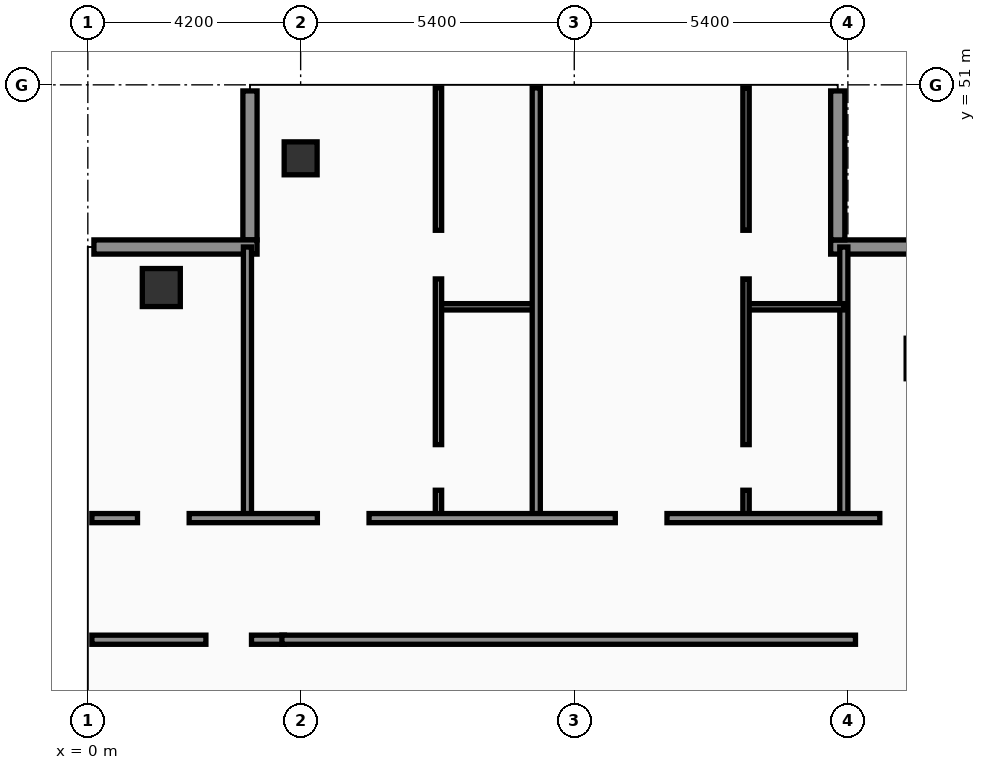
"""IFC4 building model, lengths in metres.
Left out: names, types, materials, properties, quantities, classifications, styles, units other than length and angle.
Written with IfcOpenShell. Run it as: python <this file> out.ifc"""

import sys

from ifc_helpers import new_model, si_unit, direction, frame, frame_2d, origin, origin_2d, place, context, subcontext, project, spatial, rectangle, hollow_rectangle, extrude, element, fill, save


model = new_model("IFC4")
c1 = context("Model", 3, precision=1e-05, world=origin(), true_north=direction((0.0, 1.0)))
c2 = subcontext(c1, "Body", "Model", "MODEL_VIEW")
j1 = project(units=[si_unit("LENGTHUNIT", "METRE"), si_unit("PLANEANGLEUNIT", "RADIAN")], contexts=[c1])
p1 = place(None, origin())
s1 = spatial("IfcSite", under=j1, at=p1, CompositionType="ELEMENT")
p2 = place(p1, origin())
s2 = spatial("IfcBuilding", under=s1, at=p2, CompositionType="ELEMENT")
p3 = place(p2, frame((0.0, 0.0, 211.0)))
s3 = spatial("IfcBuildingStorey", under=s2, at=p3, CompositionType="ELEMENT", Elevation=211.0)
p4 = place(p3, frame((1.45, 47.0, 0.0), z_axis=(0.0, 0.0, 1.0), x_axis=(1.0, 0.0, 0.0)))
e1 = element("IfcColumn", 1, at=p4, inside=s3, PredefinedType="COLUMN", context=c2, shape_type="SweptSolid", body=[
    extrude(hollow_rectangle(XDim=0.75, YDim=0.75, WallThickness=0.032, at=origin_2d()), origin(), (0.0, 0.0, 1.0), 3.56),
])
p5 = place(p3, frame((4.2, 49.55, 0.0), z_axis=(0.0, 0.0, 1.0), x_axis=(1.0, 0.0, 0.0)))
e2 = element("IfcColumn", 2, at=p5, inside=s3, PredefinedType="COLUMN", context=c2, shape_type="SweptSolid", body=[
    extrude(hollow_rectangle(XDim=0.65, YDim=0.65, WallThickness=0.028, at=origin_2d()), origin(), (0.0, 0.0, 1.0), 3.56),
])
p6 = place(p3, frame((17.9, 47.8, 0.0), z_axis=(0.0, 0.0, 1.0), x_axis=(-1.0, 0.0, 0.0)))
e3 = element("IfcWall", 3, at=p6, inside=s3, PredefinedType="SOLIDWALL", context=c2, shape_type="SweptSolid", body=[
    extrude(rectangle(XDim=3.24, YDim=0.28, at=frame_2d((1.62, 0.0))), origin(), (0.0, 0.0, 1.0), 3.56),
])
p7 = place(p3, frame((14.8, 47.94, 0.0), z_axis=(0.0, 0.0, 1.0), x_axis=(0.0, 1.0, 0.0)))
e4 = element("IfcWall", 4, at=p7, inside=s3, PredefinedType="SOLIDWALL", context=c2, shape_type="SweptSolid", body=[
    extrude(rectangle(XDim=2.94, YDim=0.28, at=frame_2d((1.47, 0.0))), origin(), (0.0, 0.0, 1.0), 3.56),
])
p8 = place(p3, frame((3.2, 50.88, 0.0), z_axis=(0.0, 0.0, 1.0), x_axis=(0.0, -1.0, 0.0)))
e5 = element("IfcWall", 5, at=p8, inside=s3, PredefinedType="SOLIDWALL", context=c2, shape_type="SweptSolid", body=[
    extrude(rectangle(XDim=2.94, YDim=0.28, at=frame_2d((1.47, 0.0))), origin(), (0.0, 0.0, 1.0), 3.09),
])
p9 = place(p3, frame((3.34, 47.8, 0.0), z_axis=(0.0, 0.0, 1.0), x_axis=(-1.0, 0.0, 0.0)))
e6 = element("IfcWall", 6, at=p9, inside=s3, PredefinedType="SOLIDWALL", context=c2, shape_type="SweptSolid", body=[
    extrude(rectangle(XDim=3.22, YDim=0.28, at=frame_2d((1.61, 0.0))), origin(), (0.0, 0.0, 1.0), 3.09),
])
p10 = place(p3, frame((0.08, 40.05, 0.0), z_axis=(0.0, 0.0, 1.0), x_axis=(1.0, 0.0, 0.0)))
e7 = element("IfcWall", 7, at=p10, inside=s3, PredefinedType="PARTITIONING", context=c2, shape_type="SweptSolid", body=[
    extrude(rectangle(XDim=3.8, YDim=0.18, at=frame_2d((1.9, 0.0))), origin(), (0.0, 0.0, 1.0), 2.94),
])
p11 = place(p10, frame((2.25, 0.0, 0.0)))
e8 = element("IfcOpeningElement", 8, at=p11, cuts=e7, PredefinedType="OPENING", context=c2, shape_type="SweptSolid", body=[
    extrude(rectangle(XDim=0.9, YDim=2.15, at=frame_2d((0.45, 1.075))), frame((0.0, 0.1, 0.0), z_axis=(0.0, -1.0, 0.0), x_axis=(1.0, 0.0, 0.0)), (0.0, 0.0, 1.0), 0.2),
])
p12 = place(p3, frame((3.15, 42.45, 0.0), z_axis=(0.0, 0.0, 1.0), x_axis=(0.0, 1.0, 0.0)))
e9 = element("IfcWall", 9, at=p12, inside=s3, PredefinedType="PARTITIONING", context=c2, shape_type="SweptSolid", body=[
    extrude(rectangle(XDim=5.35, YDim=0.16, at=frame_2d((2.675, 0.0))), origin(), (0.0, 0.0, 1.0), 3.14),
])
p13 = place(p3, frame((14.92, 42.45, 0.0), z_axis=(0.0, 0.0, 1.0), x_axis=(0.0, 1.0, 0.0)))
e10 = element("IfcWall", 10, at=p13, inside=s3, PredefinedType="PARTITIONING", context=c2, shape_type="SweptSolid", body=[
    extrude(rectangle(XDim=5.35, YDim=0.16, at=frame_2d((2.675, 0.0))), origin(), (0.0, 0.0, 1.0), 3.09),
])
p14 = place(p3, frame((6.92, 46.62, 0.0), z_axis=(0.0, 0.0, 1.0), x_axis=(1.0, 0.0, 0.0)))
e11 = element("IfcWall", 11, at=p14, inside=s3, PredefinedType="PARTITIONING", context=c2, shape_type="SweptSolid", body=[
    extrude(rectangle(XDim=1.93, YDim=0.125, at=frame_2d((0.965, 0.0))), origin(), (0.0, 0.0, 1.0), 3.56),
])
p15 = place(p3, frame((6.92, 42.45, 0.0), z_axis=(0.0, 0.0, 1.0), x_axis=(0.0, 1.0, 0.0)))
e12 = element("IfcWall", 12, at=p15, inside=s3, PredefinedType="PARTITIONING", context=c2, shape_type="SweptSolid", body=[
    extrude(rectangle(XDim=8.49, YDim=0.125, at=frame_2d((4.245, 0.0))), origin(), (0.0, 0.0, 1.0), 3.09),
])
p16 = place(p15, frame((0.55, 0.0, 0.0)))
e13 = element("IfcOpeningElement", 13, at=p16, cuts=e12, PredefinedType="OPENING", context=c2, shape_type="SweptSolid", body=[
    extrude(rectangle(XDim=0.9, YDim=2.15, at=frame_2d((0.45, 1.075))), frame((0.0, 0.073, 0.0), z_axis=(0.0, -1.0, 0.0), x_axis=(1.0, 0.0, 0.0)), (0.0, 0.0, 1.0), 0.145),
])
p17 = place(p15, frame((4.72, 0.0, 0.0)))
e14 = element("IfcOpeningElement", 14, at=p17, cuts=e12, PredefinedType="OPENING", context=c2, shape_type="SweptSolid", body=[
    extrude(rectangle(XDim=0.96, YDim=2.2, at=frame_2d((0.48, 1.1))), frame((0.0, 0.073, 0.0), z_axis=(0.0, -1.0, 0.0), x_axis=(1.0, 0.0, 0.0)), (0.0, 0.0, 1.0), 0.145),
])
p18 = place(p3, frame((12.99, 46.62, 0.0), z_axis=(0.0, 0.0, 1.0), x_axis=(1.0, 0.0, 0.0)))
e15 = element("IfcWall", 15, at=p18, inside=s3, PredefinedType="PARTITIONING", context=c2, shape_type="SweptSolid", body=[
    extrude(rectangle(XDim=1.93, YDim=0.125, at=frame_2d((0.965, 0.0))), origin(), (0.0, 0.0, 1.0), 3.09),
])
p19 = place(p3, frame((12.99, 42.45, 0.0), z_axis=(0.0, 0.0, 1.0), x_axis=(0.0, 1.0, 0.0)))
e16 = element("IfcWall", 16, at=p19, inside=s3, PredefinedType="PARTITIONING", context=c2, shape_type="SweptSolid", body=[
    extrude(rectangle(XDim=8.49, YDim=0.125, at=frame_2d((4.245, 0.0))), origin(), (0.0, 0.0, 1.0), 3.09),
])
p20 = place(p19, frame((0.55, 0.0, 0.0)))
e17 = element("IfcOpeningElement", 17, at=p20, cuts=e16, PredefinedType="OPENING", context=c2, shape_type="SweptSolid", body=[
    extrude(rectangle(XDim=0.9, YDim=2.15, at=frame_2d((0.45, 1.075))), frame((0.0, 0.073, 0.0), z_axis=(0.0, -1.0, 0.0), x_axis=(1.0, 0.0, 0.0)), (0.0, 0.0, 1.0), 0.145),
])
p21 = place(p19, frame((4.72, 0.0, 0.0)))
e18 = element("IfcOpeningElement", 18, at=p21, cuts=e16, PredefinedType="OPENING", context=c2, shape_type="SweptSolid", body=[
    extrude(rectangle(XDim=0.96, YDim=2.2, at=frame_2d((0.48, 1.1))), frame((0.0, 0.073, 0.0), z_axis=(0.0, -1.0, 0.0), x_axis=(1.0, 0.0, 0.0)), (0.0, 0.0, 1.0), 0.145),
])
p22 = place(p3, frame((8.85, 42.45, 0.0), z_axis=(0.0, 0.0, 1.0), x_axis=(0.0, 1.0, 0.0)))
e19 = element("IfcWall", 19, at=p22, inside=s3, PredefinedType="PARTITIONING", context=c2, shape_type="SweptSolid", body=[
    extrude(rectangle(XDim=8.49, YDim=0.16, at=frame_2d((4.245, 0.0))), origin(), (0.0, 0.0, 1.0), 3.09),
])
p23 = place(p3, frame((0.08, 42.45, 0.0), z_axis=(0.0, 0.0, 1.0), x_axis=(1.0, 0.0, 0.0)))
e20 = element("IfcWall", 20, at=p23, inside=s3, PredefinedType="PARTITIONING", context=c2, shape_type="SweptSolid", body=[
    extrude(rectangle(XDim=17.77, YDim=0.18, at=frame_2d((8.885, 0.0))), origin(), (0.0, 0.0, 1.0), 2.94),
])
p24 = place(p23, frame((0.9, 0.0, 0.0)))
e21 = element("IfcOpeningElement", 21, at=p24, cuts=e20, PredefinedType="OPENING", context=c2, shape_type="SweptSolid", body=[
    extrude(rectangle(XDim=1.02, YDim=2.2, at=frame_2d((0.51, 1.1))), frame((0.0, 0.1, 0.0), z_axis=(0.0, -1.0, 0.0), x_axis=(1.0, 0.0, 0.0)), (0.0, 0.0, 1.0), 0.2),
])
p25 = place(p23, frame((4.45, 0.0, 0.0)))
e22 = element("IfcOpeningElement", 22, at=p25, cuts=e20, PredefinedType="OPENING", context=c2, shape_type="SweptSolid", body=[
    extrude(rectangle(XDim=1.02, YDim=2.2, at=frame_2d((0.51, 1.1))), frame((0.0, 0.1, 0.0), z_axis=(0.0, -1.0, 0.0), x_axis=(1.0, 0.0, 0.0)), (0.0, 0.0, 1.0), 0.2),
])
p26 = place(p23, frame((10.33, 0.0, 0.0)))
e23 = element("IfcOpeningElement", 23, at=p26, cuts=e20, PredefinedType="OPENING", context=c2, shape_type="SweptSolid", body=[
    extrude(rectangle(XDim=1.02, YDim=2.2, at=frame_2d((0.51, 1.1))), frame((0.0, 0.1, 0.0), z_axis=(0.0, -1.0, 0.0), x_axis=(1.0, 0.0, 0.0)), (0.0, 0.0, 1.0), 0.2),
])
p27 = place(p23, frame((15.55, 0.0, 0.0)))
e24 = element("IfcOpeningElement", 24, at=p27, cuts=e20, PredefinedType="OPENING", context=c2, shape_type="SweptSolid", body=[
    extrude(rectangle(XDim=1.02, YDim=2.2, at=frame_2d((0.51, 1.1))), frame((0.0, 0.1, 0.0), z_axis=(0.0, -1.0, 0.0), x_axis=(1.0, 0.0, 0.0)), (0.0, 0.0, 1.0), 0.2),
])
p28 = place(p3, frame((3.83, 40.05, 0.0), z_axis=(0.0, 0.0, 1.0), x_axis=(1.0, 0.0, 0.0)))
e25 = element("IfcWall", 25, at=p28, inside=s3, PredefinedType="PARTITIONING", context=c2, shape_type="SweptSolid", body=[
    extrude(rectangle(XDim=11.32, YDim=0.18, at=frame_2d((5.66, 0.0))), origin(), (0.0, 0.0, 1.0), 2.94),
])
p29 = place(p11, origin())
e26 = element("IfcDoor", 26, at=p29, inside=s3, OperationType="SINGLE_SWING_LEFT", PredefinedType="DOOR", context=c2, shape_type="SweptSolid", body=[
    extrude(rectangle(XDim=0.9, YDim=2.15, at=frame_2d((0.45, 1.075))), frame((0.0, 0.025, 0.0), z_axis=(0.0, -1.0, 0.0), x_axis=(1.0, 0.0, 0.0)), (0.0, 0.0, 1.0), 0.05),
])
fill(e8, e26)
p30 = place(p16, origin())
e27 = element("IfcDoor", 27, at=p30, inside=s3, OperationType="SINGLE_SWING_LEFT", PredefinedType="DOOR", context=c2, shape_type="SweptSolid", body=[
    extrude(rectangle(XDim=0.9, YDim=2.15, at=frame_2d((0.45, 1.075))), frame((0.0, 0.025, 0.0), z_axis=(0.0, -1.0, 0.0), x_axis=(1.0, 0.0, 0.0)), (0.0, 0.0, 1.0), 0.05),
])
fill(e13, e27)
p31 = place(p17, origin())
e28 = element("IfcDoor", 28, at=p31, inside=s3, OperationType="SINGLE_SWING_RIGHT", PredefinedType="DOOR", context=c2, shape_type="SweptSolid", body=[
    extrude(rectangle(XDim=0.96, YDim=2.2, at=frame_2d((0.48, 1.1))), frame((0.0, 0.025, 0.0), z_axis=(0.0, -1.0, 0.0), x_axis=(1.0, 0.0, 0.0)), (0.0, 0.0, 1.0), 0.05),
])
fill(e14, e28)
p32 = place(p20, origin())
e29 = element("IfcDoor", 29, at=p32, inside=s3, OperationType="SINGLE_SWING_LEFT", PredefinedType="DOOR", context=c2, shape_type="SweptSolid", body=[
    extrude(rectangle(XDim=0.9, YDim=2.15, at=frame_2d((0.45, 1.075))), frame((0.0, 0.025, 0.0), z_axis=(0.0, -1.0, 0.0), x_axis=(1.0, 0.0, 0.0)), (0.0, 0.0, 1.0), 0.05),
])
fill(e17, e29)
p33 = place(p21, origin())
e30 = element("IfcDoor", 30, at=p33, inside=s3, OperationType="SINGLE_SWING_RIGHT", PredefinedType="DOOR", context=c2, shape_type="SweptSolid", body=[
    extrude(rectangle(XDim=0.96, YDim=2.2, at=frame_2d((0.48, 1.1))), frame((0.0, 0.025, 0.0), z_axis=(0.0, -1.0, 0.0), x_axis=(1.0, 0.0, 0.0)), (0.0, 0.0, 1.0), 0.05),
])
fill(e18, e30)
p34 = place(p24, origin())
e31 = element("IfcDoor", 31, at=p34, inside=s3, OperationType="SINGLE_SWING_LEFT", PredefinedType="DOOR", context=c2, shape_type="SweptSolid", body=[
    extrude(rectangle(XDim=1.02, YDim=2.2, at=frame_2d((0.51, 1.1))), frame((0.0, 0.025, 0.0), z_axis=(0.0, -1.0, 0.0), x_axis=(1.0, 0.0, 0.0)), (0.0, 0.0, 1.0), 0.05),
])
fill(e21, e31)
p35 = place(p25, origin())
e32 = element("IfcDoor", 32, at=p35, inside=s3, OperationType="SINGLE_SWING_RIGHT", PredefinedType="DOOR", context=c2, shape_type="SweptSolid", body=[
    extrude(rectangle(XDim=1.02, YDim=2.2, at=frame_2d((0.51, 1.1))), frame((0.0, 0.025, 0.0), z_axis=(0.0, -1.0, 0.0), x_axis=(1.0, 0.0, 0.0)), (0.0, 0.0, 1.0), 0.05),
])
fill(e22, e32)
p36 = place(p26, origin())
e33 = element("IfcDoor", 33, at=p36, inside=s3, OperationType="SINGLE_SWING_LEFT", PredefinedType="DOOR", context=c2, shape_type="SweptSolid", body=[
    extrude(rectangle(XDim=1.02, YDim=2.2, at=frame_2d((0.51, 1.1))), frame((0.0, 0.025, 0.0), z_axis=(0.0, -1.0, 0.0), x_axis=(1.0, 0.0, 0.0)), (0.0, 0.0, 1.0), 0.05),
])
fill(e23, e33)
p37 = place(p27, origin())
e34 = element("IfcDoor", 34, at=p37, inside=s3, OperationType="SINGLE_SWING_RIGHT", PredefinedType="DOOR", context=c2, shape_type="SweptSolid", body=[
    extrude(rectangle(XDim=1.02, YDim=2.2, at=frame_2d((0.51, 1.1))), frame((0.0, 0.025, 0.0), z_axis=(0.0, -1.0, 0.0), x_axis=(1.0, 0.0, 0.0)), (0.0, 0.0, 1.0), 0.05),
])
fill(e24, e34)
save(model, sys.argv[1])
